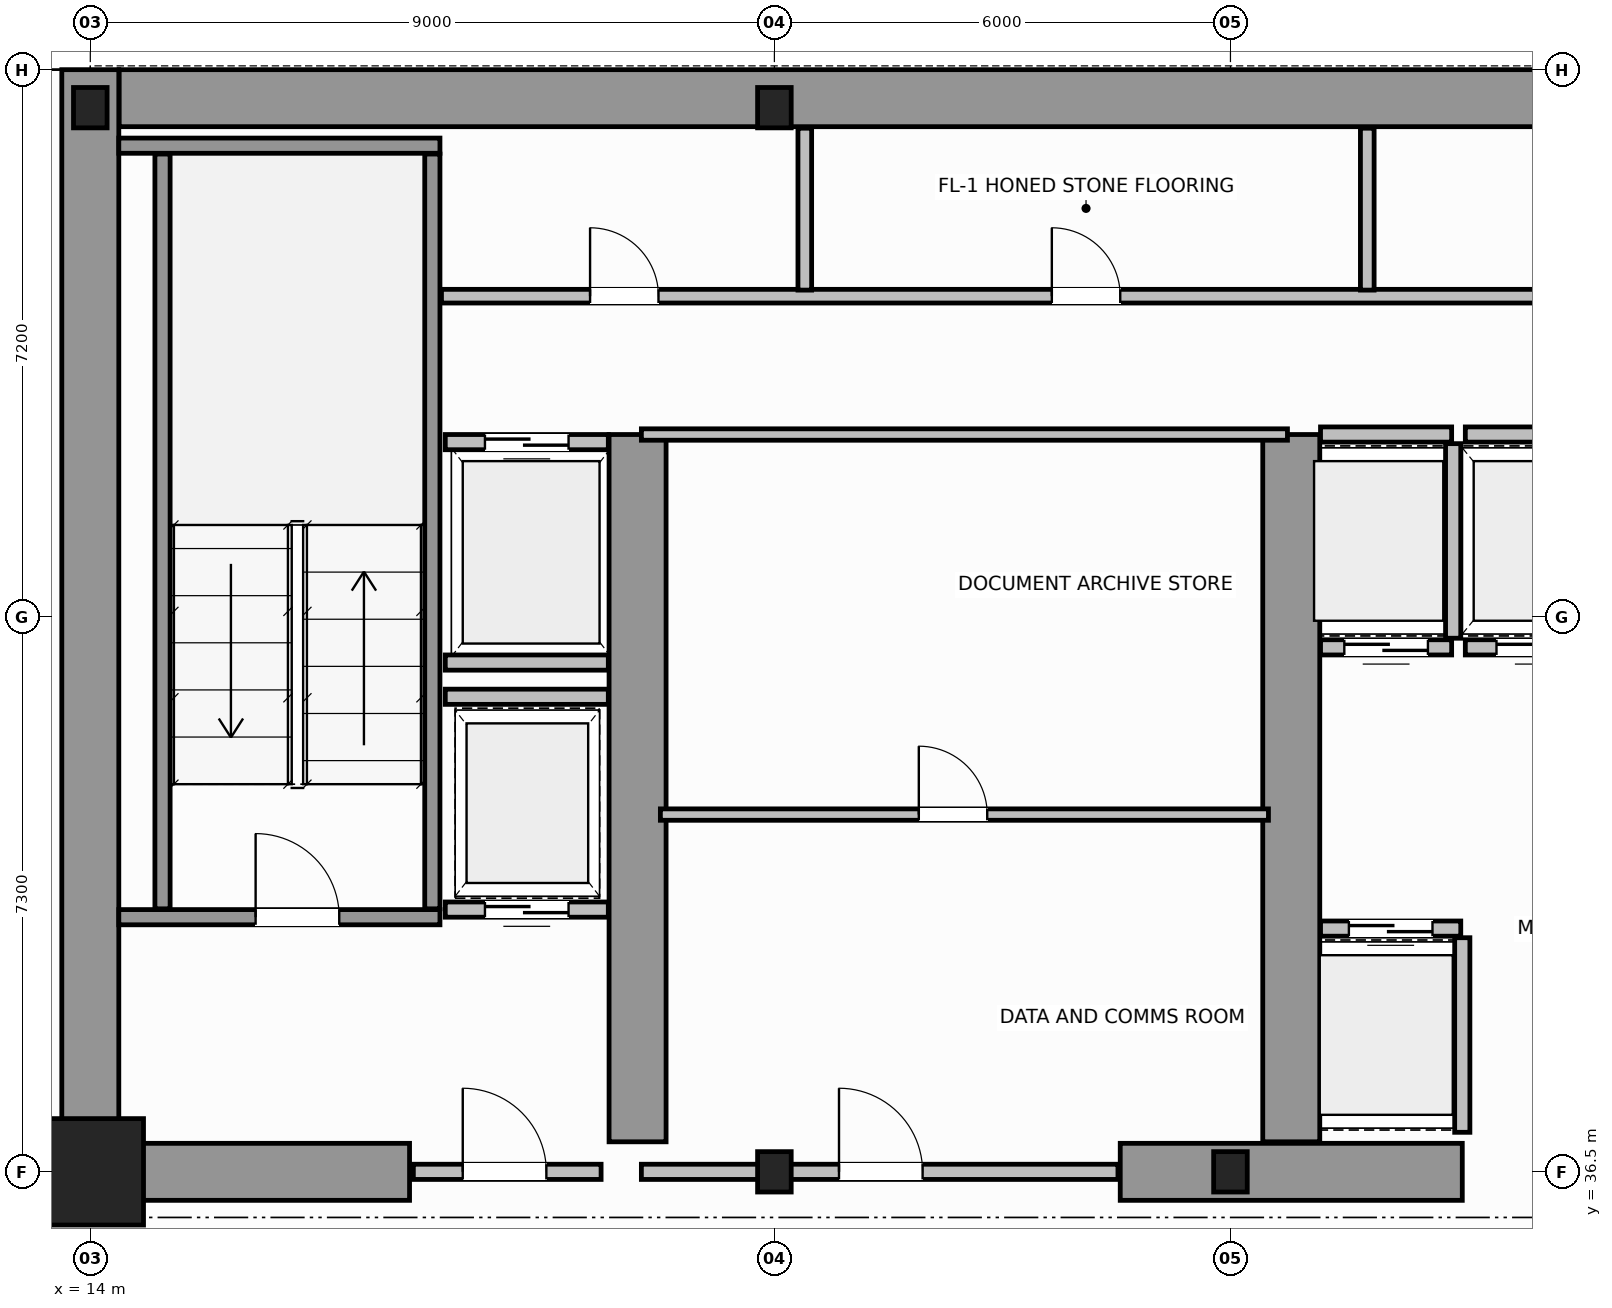
"""IFC4 building model, lengths in metres.
Left out: names, types, materials, properties, quantities, classifications, styles, units other than length and angle.
Written with IfcOpenShell. Run it as: python <this file> out.ifc"""

import sys

from ifc_helpers import new_model, si_unit, direction, frame, frame_2d, origin, origin_2d, place, context, subcontext, project, spatial, rectangle, i_section, extrude, source, transform, mapped, element, fill, save


model = new_model("IFC4")
c1 = context("Model", 3, precision=1e-05, world=origin(), true_north=direction((0.0, 1.0)))
c2 = subcontext(c1, "Body", "Model", "MODEL_VIEW")
j1 = project(units=[si_unit("LENGTHUNIT", "METRE"), si_unit("PLANEANGLEUNIT", "RADIAN")], contexts=[c1])
p1 = place(None, origin())
s1 = spatial("IfcSite", under=j1, at=p1, CompositionType="ELEMENT")
p2 = place(p1, origin())
s2 = spatial("IfcBuilding", under=s1, at=p2, CompositionType="ELEMENT")
p3 = place(p2, frame((0.0, 0.0, 114.8)))
s3 = spatial("IfcBuildingStorey", under=s2, at=p3, CompositionType="ELEMENT", Elevation=114.8)
m1 = source(origin(), c2, "Body", "SweptSolid", [
    extrude(rectangle(XDim=1.4, YDim=1.4, at=origin_2d()), origin(), (0.0, 0.0, 1.0), 3.8),
])
p4 = place(p3, frame((14.0, 36.5, 0.0), z_axis=(0.0, 0.0, 1.0), x_axis=(1.0, 0.0, 0.0)))
e1 = element("IfcColumn", 1, at=p4, inside=s3, PredefinedType="COLUMN", context=c2, shape_type="MappedRepresentation", body=[
    mapped(m1, transform((0.0, 0.0, 0.0), scale=1.0)),
])
m2 = source(origin(), c2, "Body", "SweptSolid", [
    extrude(i_section(OverallWidth=0.442, OverallDepth=0.531, WebThickness=0.065, FlangeThickness=0.076, FilletRadius=0.015, at=origin_2d()), origin(), (0.0, 0.0, 1.0), 3.8),
])
for number, where, z_axis, x_axis in (
    (2, (23.0, 36.5, 0.0), (0.0, 0.0, 1.0), (1.0, 0.0, 0.0)),
    (3, (29.0, 36.5, 0.0), (0.0, 0.0, 1.0), (1.0, 0.0, 0.0)),
    (4, (14.0, 50.5, 0.0), (0.0, 0.0, 1.0), (1.0, 0.0, 0.0)),
    (5, (23.0, 50.5, 0.0), (0.0, 0.0, 1.0), (1.0, 0.0, 0.0)),
):
    element("IfcColumn", number, at=place(p3, frame(where, z_axis=z_axis, x_axis=x_axis)), inside=s3, PredefinedType="COLUMN", context=c2, shape_type="MappedRepresentation", body=[
        mapped(m2, transform((0.0, 0.0, 0.0), scale=1.0)),
    ])
p5 = place(p3, frame((14.379, 50.625, 0.0), z_axis=(0.0, 0.0, 1.0), x_axis=(1.0, 0.0, 0.0)))
e6 = element("IfcWall", 6, at=p5, inside=s3, PredefinedType="SHEAR", context=c2, shape_type="SweptSolid", body=[
    extrude(rectangle(XDim=19.619, YDim=0.75, at=frame_2d((9.81, 0.0))), origin(), (0.0, 0.0, 1.0), 3.8),
])
p6 = place(p3, frame((14.0, 36.5, 0.0), z_axis=(0.0, 0.0, 1.0), x_axis=(0.0, 1.0, 0.0)))
e7 = element("IfcWall", 7, at=p6, inside=s3, PredefinedType="SHEAR", context=c2, shape_type="SweptSolid", body=[
    extrude(rectangle(XDim=14.5, YDim=0.75, at=frame_2d((7.25, 0.0))), origin(), (0.0, 0.0, 1.0), 3.8),
])
p7 = place(p3, frame((14.395, 36.5, 0.0), z_axis=(0.0, 0.0, 1.0), x_axis=(1.0, 0.0, 0.0)))
e8 = element("IfcWall", 8, at=p7, inside=s3, PredefinedType="SHEAR", context=c2, shape_type="SweptSolid", body=[
    extrude(rectangle(XDim=3.805, YDim=0.75, at=frame_2d((1.902, 0.0))), origin(), (0.0, 0.0, 1.0), 2.38),
])
p8 = place(p3, frame((27.55, 36.5, 0.0), z_axis=(0.0, 0.0, 1.0), x_axis=(1.0, 0.0, 0.0)))
e9 = element("IfcWall", 9, at=p8, inside=s3, PredefinedType="SHEAR", context=c2, shape_type="SweptSolid", body=[
    extrude(rectangle(XDim=4.5, YDim=0.75, at=frame_2d((2.25, 0.0))), origin(), (0.0, 0.0, 1.0), 3.8),
])
for number, where, z_axis, x_axis in (
    (10, (21.2, 36.895, 0.0), (0.0, 0.0, 1.0), (0.0, 1.0, 0.0)),
    (11, (29.8, 36.895, 0.0), (0.0, 0.0, 1.0), (0.0, 1.0, 0.0)),
):
    element("IfcWall", number, at=place(p3, frame(where, z_axis=z_axis, x_axis=x_axis)), inside=s3, PredefinedType="SHEAR", context=c2, shape_type="SweptSolid", body=[
        extrude(rectangle(XDim=9.305, YDim=0.75, at=frame_2d((4.652, 0.0))), origin(), (0.0, 0.0, 1.0), 3.8),
    ])
p9 = place(p3, frame((14.375, 39.85, 0.0), z_axis=(0.0, 0.0, 1.0), x_axis=(1.0, 0.0, 0.0)))
e12 = element("IfcWall", 12, at=p9, inside=s3, PredefinedType="SOLIDWALL", context=c2, shape_type="SweptSolid", body=[
    extrude(rectangle(XDim=4.225, YDim=0.2, at=frame_2d((2.113, 0.0))), origin(), (0.0, 0.0, 1.0), 3.8),
])
p10 = place(p9, frame((1.8, 0.0, 0.0)))
e13 = element("IfcOpeningElement", 13, at=p10, cuts=e12, PredefinedType="OPENING", context=c2, shape_type="SweptSolid", body=[
    extrude(rectangle(XDim=1.1, YDim=2.15, at=frame_2d((0.55, 1.075))), frame((0.0, 0.11, 0.0), z_axis=(0.0, -1.0, 0.0), x_axis=(1.0, 0.0, 0.0)), (0.0, 0.0, 1.0), 0.22),
])
p11 = place(p3, frame((14.375, 50.0, 0.0), z_axis=(0.0, 0.0, 1.0), x_axis=(1.0, 0.0, 0.0)))
e14 = element("IfcWall", 14, at=p11, inside=s3, PredefinedType="SOLIDWALL", context=c2, shape_type="SweptSolid", body=[
    extrude(rectangle(XDim=4.225, YDim=0.2, at=frame_2d((2.113, 0.0))), origin(), (0.0, 0.0, 1.0), 3.8),
])
for number, where, z_axis, x_axis in (
    (15, (14.95, 39.96, 0.0), (0.0, 0.0, 1.0), (0.0, 1.0, 0.0)),
    (16, (18.5, 39.96, 0.0), (0.0, 0.0, 1.0), (0.0, 1.0, 0.0)),
):
    element("IfcWall", number, at=place(p3, frame(where, z_axis=z_axis, x_axis=x_axis)), inside=s3, PredefinedType="SOLIDWALL", context=c2, shape_type="SweptSolid", body=[
        extrude(rectangle(XDim=9.93, YDim=0.2, at=frame_2d((4.965, 0.0))), origin(), (0.0, 0.0, 1.0), 3.8),
    ])
p12 = place(p3, frame((18.25, 36.5, 0.0), z_axis=(0.0, 0.0, 1.0), x_axis=(1.0, 0.0, 0.0)))
e17 = element("IfcWall", 17, at=p12, inside=s3, PredefinedType="SOLIDWALL", context=c2, shape_type="SweptSolid", body=[
    extrude(rectangle(XDim=2.47, YDim=0.2, at=frame_2d((1.235, 0.0))), origin(), (0.0, 0.0, 1.0), 2.37),
])
p13 = place(p12, frame((0.65, 0.0, 0.0)))
e18 = element("IfcOpeningElement", 18, at=p13, cuts=e17, PredefinedType="OPENING", context=c2, shape_type="SweptSolid", body=[
    extrude(rectangle(XDim=1.1, YDim=2.15, at=frame_2d((0.55, 1.075))), frame((0.0, 0.11, 0.0), z_axis=(0.0, -1.0, 0.0), x_axis=(1.0, 0.0, 0.0)), (0.0, 0.0, 1.0), 0.22),
])
p14 = place(p3, frame((30.185, 39.7, 0.0), z_axis=(0.0, 0.0, 1.0), x_axis=(1.0, 0.0, 0.0)))
e19 = element("IfcWall", 19, at=p14, inside=s3, PredefinedType="SOLIDWALL", context=c2, shape_type="SweptSolid", body=[
    extrude(rectangle(XDim=1.845, YDim=0.2, at=frame_2d((0.922, 0.0))), origin(), (0.0, 0.0, 1.0), 3.58),
])
p15 = place(p14, frame((0.373, 0.0, 0.0)))
e20 = element("IfcOpeningElement", 20, at=p15, cuts=e19, PredefinedType="OPENING", context=c2, shape_type="SweptSolid", body=[
    extrude(rectangle(XDim=1.1, YDim=2.15, at=frame_2d((0.55, 1.075))), frame((0.0, 0.11, 0.0), z_axis=(0.0, -1.0, 0.0), x_axis=(1.0, 0.0, 0.0)), (0.0, 0.0, 1.0), 0.22),
])
p16 = place(p3, frame((32.05, 37.02, 0.0), z_axis=(0.0, 0.0, 1.0), x_axis=(0.0, 1.0, 0.0)))
e21 = element("IfcWall", 21, at=p16, inside=s3, PredefinedType="SOLIDWALL", context=c2, shape_type="SweptSolid", body=[
    extrude(rectangle(XDim=2.56, YDim=0.2, at=frame_2d((1.28, 0.0))), origin(), (0.0, 0.0, 1.0), 3.58),
])
p17 = place(p3, frame((30.185, 43.4, 0.0), z_axis=(0.0, 0.0, 1.0), x_axis=(1.0, 0.0, 0.0)))
e22 = element("IfcWall", 22, at=p17, inside=s3, PredefinedType="SOLIDWALL", context=c2, shape_type="SweptSolid", body=[
    extrude(rectangle(XDim=1.725, YDim=0.2, at=frame_2d((0.862, 0.0))), origin(), (0.0, 0.0, 1.0), 3.58),
])
p18 = place(p17, frame((0.313, 0.0, 0.0)))
e23 = element("IfcOpeningElement", 23, at=p18, cuts=e22, PredefinedType="OPENING", context=c2, shape_type="SweptSolid", body=[
    extrude(rectangle(XDim=1.1, YDim=2.15, at=frame_2d((0.55, 1.075))), frame((0.0, 0.11, 0.0), z_axis=(0.0, -1.0, 0.0), x_axis=(1.0, 0.0, 0.0)), (0.0, 0.0, 1.0), 0.22),
])
p19 = place(p3, frame((30.185, 46.2, 0.0), z_axis=(0.0, 0.0, 1.0), x_axis=(1.0, 0.0, 0.0)))
e24 = element("IfcWall", 24, at=p19, inside=s3, PredefinedType="SOLIDWALL", context=c2, shape_type="SweptSolid", body=[
    extrude(rectangle(XDim=1.725, YDim=0.2, at=frame_2d((0.862, 0.0))), origin(), (0.0, 0.0, 1.0), 3.58),
])
p20 = place(p3, frame((31.93, 43.52, 0.0), z_axis=(0.0, 0.0, 1.0), x_axis=(0.0, 1.0, 0.0)))
e25 = element("IfcWall", 25, at=p20, inside=s3, PredefinedType="SOLIDWALL", context=c2, shape_type="SweptSolid", body=[
    extrude(rectangle(XDim=2.56, YDim=0.2, at=frame_2d((1.28, 0.0))), origin(), (0.0, 0.0, 1.0), 3.58),
])
p21 = place(p3, frame((32.09, 43.4, 0.0), z_axis=(0.0, 0.0, 1.0), x_axis=(1.0, 0.0, 0.0)))
e26 = element("IfcWall", 26, at=p21, inside=s3, PredefinedType="SOLIDWALL", context=c2, shape_type="SweptSolid", body=[
    extrude(rectangle(XDim=1.92, YDim=0.2, at=frame_2d((0.96, 0.0))), origin(), (0.0, 0.0, 1.0), 3.58),
])
p22 = place(p21, frame((0.41, 0.0, 0.0)))
e27 = element("IfcOpeningElement", 27, at=p22, cuts=e26, PredefinedType="OPENING", context=c2, shape_type="SweptSolid", body=[
    extrude(rectangle(XDim=1.1, YDim=2.15, at=frame_2d((0.55, 1.075))), frame((0.0, 0.11, 0.0), z_axis=(0.0, -1.0, 0.0), x_axis=(1.0, 0.0, 0.0)), (0.0, 0.0, 1.0), 0.22),
])
p23 = place(p3, frame((32.09, 46.2, 0.0), z_axis=(0.0, 0.0, 1.0), x_axis=(1.0, 0.0, 0.0)))
e28 = element("IfcWall", 28, at=p23, inside=s3, PredefinedType="SOLIDWALL", context=c2, shape_type="SweptSolid", body=[
    extrude(rectangle(XDim=1.92, YDim=0.2, at=frame_2d((0.96, 0.0))), origin(), (0.0, 0.0, 1.0), 3.58),
])
p24 = place(p3, frame((18.67, 46.1, 0.0), z_axis=(0.0, 0.0, 1.0), x_axis=(1.0, 0.0, 0.0)))
e29 = element("IfcWall", 29, at=p24, inside=s3, PredefinedType="SOLIDWALL", context=c2, shape_type="SweptSolid", body=[
    extrude(rectangle(XDim=2.145, YDim=0.2, at=frame_2d((1.073, 0.0))), origin(), (0.0, 0.0, 1.0), 3.58),
])
p25 = place(p24, frame((0.522, 0.0, 0.0)))
e30 = element("IfcOpeningElement", 30, at=p25, cuts=e29, PredefinedType="OPENING", context=c2, shape_type="SweptSolid", body=[
    extrude(rectangle(XDim=1.1, YDim=2.15, at=frame_2d((0.55, 1.075))), frame((0.0, 0.11, 0.0), z_axis=(0.0, -1.0, 0.0), x_axis=(1.0, 0.0, 0.0)), (0.0, 0.0, 1.0), 0.22),
])
p26 = place(p3, frame((18.67, 43.2, 0.0), z_axis=(0.0, 0.0, 1.0), x_axis=(1.0, 0.0, 0.0)))
e31 = element("IfcWall", 31, at=p26, inside=s3, PredefinedType="SOLIDWALL", context=c2, shape_type="SweptSolid", body=[
    extrude(rectangle(XDim=2.145, YDim=0.2, at=frame_2d((1.073, 0.0))), origin(), (0.0, 0.0, 1.0), 3.58),
])
p27 = place(p3, frame((18.67, 39.95, 0.0), z_axis=(0.0, 0.0, 1.0), x_axis=(1.0, 0.0, 0.0)))
e32 = element("IfcWall", 32, at=p27, inside=s3, PredefinedType="SOLIDWALL", context=c2, shape_type="SweptSolid", body=[
    extrude(rectangle(XDim=2.145, YDim=0.2, at=frame_2d((1.073, 0.0))), origin(), (0.0, 0.0, 1.0), 3.58),
])
p28 = place(p27, frame((0.522, 0.0, 0.0)))
e33 = element("IfcOpeningElement", 33, at=p28, cuts=e32, PredefinedType="OPENING", context=c2, shape_type="SweptSolid", body=[
    extrude(rectangle(XDim=1.1, YDim=2.15, at=frame_2d((0.55, 1.075))), frame((0.0, 0.11, 0.0), z_axis=(0.0, -1.0, 0.0), x_axis=(1.0, 0.0, 0.0)), (0.0, 0.0, 1.0), 0.22),
])
p29 = place(p3, frame((18.67, 42.75, 0.0), z_axis=(0.0, 0.0, 1.0), x_axis=(1.0, 0.0, 0.0)))
e34 = element("IfcWall", 34, at=p29, inside=s3, PredefinedType="SOLIDWALL", context=c2, shape_type="SweptSolid", body=[
    extrude(rectangle(XDim=2.145, YDim=0.2, at=frame_2d((1.073, 0.0))), origin(), (0.0, 0.0, 1.0), 3.58),
])
p30 = place(p3, frame((21.25, 36.5, 0.0), z_axis=(0.0, 0.0, 1.0), x_axis=(1.0, 0.0, 0.0)))
e35 = element("IfcWall", 35, at=p30, inside=s3, PredefinedType="SOLIDWALL", context=c2, shape_type="SweptSolid", body=[
    extrude(rectangle(XDim=6.27, YDim=0.2, at=frame_2d((3.135, 0.0))), origin(), (0.0, 0.0, 1.0), 2.37),
])
p31 = place(p30, frame((2.6, 0.0, 0.0)))
e36 = element("IfcOpeningElement", 36, at=p31, cuts=e35, PredefinedType="OPENING", context=c2, shape_type="SweptSolid", body=[
    extrude(rectangle(XDim=1.1, YDim=2.15, at=frame_2d((0.55, 1.075))), frame((0.0, 0.11, 0.0), z_axis=(0.0, -1.0, 0.0), x_axis=(1.0, 0.0, 0.0)), (0.0, 0.0, 1.0), 0.22),
])
p32 = place(p3, frame((21.25, 46.2, 0.0), z_axis=(0.0, 0.0, 1.0), x_axis=(1.0, 0.0, 0.0)))
e37 = element("IfcWall", 37, at=p32, inside=s3, PredefinedType="PARTITIONING", context=c2, shape_type="SweptSolid", body=[
    extrude(rectangle(XDim=8.5, YDim=0.15, at=frame_2d((4.25, 0.0))), origin(), (0.0, 0.0, 1.0), 3.58),
])
p33 = place(p3, frame((21.5, 41.2, 0.0), z_axis=(0.0, 0.0, 1.0), x_axis=(1.0, 0.0, 0.0)))
e38 = element("IfcWall", 38, at=p33, inside=s3, PredefinedType="PARTITIONING", context=c2, shape_type="SweptSolid", body=[
    extrude(rectangle(XDim=8.0, YDim=0.15, at=frame_2d((4.0, 0.0))), origin(), (0.0, 0.0, 1.0), 3.58),
])
p34 = place(p33, frame((3.4, 0.0, 0.0)))
e39 = element("IfcOpeningElement", 39, at=p34, cuts=e38, PredefinedType="OPENING", context=c2, shape_type="SweptSolid", body=[
    extrude(rectangle(XDim=0.9, YDim=2.1, at=frame_2d((0.45, 1.05))), frame((0.0, 0.085, 0.0), z_axis=(0.0, -1.0, 0.0), x_axis=(1.0, 0.0, 0.0)), (0.0, 0.0, 1.0), 0.17),
])
p35 = place(p3, frame((18.62, 48.02, 0.0), z_axis=(0.0, 0.0, 1.0), x_axis=(1.0, 0.0, 0.0)))
e40 = element("IfcWall", 40, at=p35, inside=s3, PredefinedType="PLUMBINGWALL", context=c2, shape_type="SweptSolid", body=[
    extrude(rectangle(XDim=30.76, YDim=0.18, at=frame_2d((15.38, 0.0))), origin(), (0.0, 0.0, 1.0), 3.58),
])
p36 = place(p35, frame((1.955, 0.0, 0.0)))
e41 = element("IfcOpeningElement", 41, at=p36, cuts=e40, PredefinedType="OPENING", context=c2, shape_type="SweptSolid", body=[
    extrude(rectangle(XDim=0.9, YDim=2.15, at=frame_2d((0.45, 1.075))), frame((0.0, 0.1, 0.0), z_axis=(0.0, -1.0, 0.0), x_axis=(1.0, 0.0, 0.0)), (0.0, 0.0, 1.0), 0.2),
])
p37 = place(p35, frame((8.03, 0.0, 0.0)))
e42 = element("IfcOpeningElement", 42, at=p37, cuts=e40, PredefinedType="OPENING", context=c2, shape_type="SweptSolid", body=[
    extrude(rectangle(XDim=0.9, YDim=2.15, at=frame_2d((0.45, 1.075))), frame((0.0, 0.1, 0.0), z_axis=(0.0, -1.0, 0.0), x_axis=(1.0, 0.0, 0.0)), (0.0, 0.0, 1.0), 0.2),
])
p38 = place(p35, frame((16.93, 0.0, 0.0)))
e43 = element("IfcOpeningElement", 43, at=p38, cuts=e40, PredefinedType="OPENING", context=c2, shape_type="SweptSolid", body=[
    extrude(rectangle(XDim=0.9, YDim=2.15, at=frame_2d((0.45, 1.075))), frame((0.0, 0.1, 0.0), z_axis=(0.0, -1.0, 0.0), x_axis=(1.0, 0.0, 0.0)), (0.0, 0.0, 1.0), 0.2),
])
p39 = place(p35, frame((26.205, 0.0, 0.0)))
e44 = element("IfcOpeningElement", 44, at=p39, cuts=e40, PredefinedType="OPENING", context=c2, shape_type="SweptSolid", body=[
    extrude(rectangle(XDim=0.9, YDim=2.15, at=frame_2d((0.45, 1.075))), frame((0.0, 0.1, 0.0), z_axis=(0.0, -1.0, 0.0), x_axis=(1.0, 0.0, 0.0)), (0.0, 0.0, 1.0), 0.2),
])
for number, where, z_axis, x_axis in (
    (45, (23.4, 48.1, 0.0), (0.0, 0.0, 1.0), (0.0, 1.0, 0.0)),
    (46, (30.8, 48.1, 0.0), (0.0, 0.0, 1.0), (0.0, 1.0, 0.0)),
):
    element("IfcWall", number, at=place(p3, frame(where, z_axis=z_axis, x_axis=x_axis)), inside=s3, PredefinedType="PLUMBINGWALL", context=c2, shape_type="SweptSolid", body=[
        extrude(rectangle(XDim=2.13, YDim=0.18, at=frame_2d((1.065, 0.0))), origin(), (0.0, 0.0, 1.0), 3.58),
    ])
p40 = place(p3, frame((7.27, 36.48, 0.0), z_axis=(0.0, 0.0, 1.0), x_axis=(1.0, 0.0, 0.0)))
e47 = element("IfcWall", 47, at=p40, inside=s3, PredefinedType="PARTITIONING", context=c2, shape_type="SweptSolid", body=[
    extrude(rectangle(XDim=6.67, YDim=0.12, at=frame_2d((3.335, 0.0))), origin(), (0.0, 0.0, 1.0), 2.87),
])
p41 = place(p40, frame((2.885, 0.0, 0.0)))
e48 = element("IfcOpeningElement", 48, at=p41, cuts=e47, PredefinedType="OPENING", context=c2, shape_type="SweptSolid", body=[
    extrude(rectangle(XDim=0.9, YDim=2.15, at=frame_2d((0.45, 1.075))), frame((0.0, 0.07, 0.0), z_axis=(0.0, -1.0, 0.0), x_axis=(1.0, 0.0, 0.0)), (0.0, 0.0, 1.0), 0.14),
])
m3 = source(origin(), c2, "Body", "SweptSolid", [
    extrude(rectangle(XDim=1.1, YDim=2.15, at=frame_2d((0.55, 1.075))), frame((0.0, 0.025, 0.0), z_axis=(0.0, -1.0, 0.0), x_axis=(1.0, 0.0, 0.0)), (0.0, 0.0, 1.0), 0.05),
])
p42 = place(p10, origin())
e49 = element("IfcDoor", 49, at=p42, inside=s3, OperationType="SINGLE_SWING_LEFT", PredefinedType="DOOR", context=c2, shape_type="MappedRepresentation", body=[
    mapped(m3, transform((0.0, 0.0, 0.0), scale=1.0)),
])
fill(e13, e49)
p43 = place(p13, origin())
e50 = element("IfcDoor", 50, at=p43, inside=s3, OperationType="SINGLE_SWING_RIGHT", PredefinedType="DOOR", context=c2, shape_type="MappedRepresentation", body=[
    mapped(m3, transform((0.0, 0.0, 0.0), scale=1.0)),
])
fill(e18, e50)
p44 = place(p15, origin())
e51 = element("IfcDoor", 51, at=p44, inside=s3, OperationType="DOUBLE_DOOR_SLIDING", PredefinedType="DOOR", context=c2, shape_type="MappedRepresentation", body=[
    mapped(m3, transform((0.0, 0.0, 0.0), scale=1.0)),
])
fill(e20, e51)
p45 = place(p18, origin())
e52 = element("IfcDoor", 52, at=p45, inside=s3, OperationType="DOUBLE_DOOR_SLIDING", PredefinedType="DOOR", context=c2, shape_type="MappedRepresentation", body=[
    mapped(m3, transform((0.0, 0.0, 0.0), scale=1.0)),
])
fill(e23, e52)
p46 = place(p22, origin())
e53 = element("IfcDoor", 53, at=p46, inside=s3, OperationType="DOUBLE_DOOR_SLIDING", PredefinedType="DOOR", context=c2, shape_type="MappedRepresentation", body=[
    mapped(m3, transform((0.0, 0.0, 0.0), scale=1.0)),
])
fill(e27, e53)
p47 = place(p25, origin())
e54 = element("IfcDoor", 54, at=p47, inside=s3, OperationType="DOUBLE_DOOR_SLIDING", PredefinedType="DOOR", context=c2, shape_type="MappedRepresentation", body=[
    mapped(m3, transform((0.0, 0.0, 0.0), scale=1.0)),
])
fill(e30, e54)
p48 = place(p28, origin())
e55 = element("IfcDoor", 55, at=p48, inside=s3, OperationType="DOUBLE_DOOR_SLIDING", PredefinedType="DOOR", context=c2, shape_type="MappedRepresentation", body=[
    mapped(m3, transform((0.0, 0.0, 0.0), scale=1.0)),
])
fill(e33, e55)
p49 = place(p31, origin())
e56 = element("IfcDoor", 56, at=p49, inside=s3, OperationType="SINGLE_SWING_LEFT", PredefinedType="DOOR", context=c2, shape_type="MappedRepresentation", body=[
    mapped(m3, transform((0.0, 0.0, 0.0), scale=1.0)),
])
fill(e36, e56)
m4 = source(origin(), c2, "Body", "SweptSolid", [
    extrude(rectangle(XDim=0.9, YDim=2.1, at=frame_2d((0.45, 1.05))), frame((0.0, 0.025, 0.0), z_axis=(0.0, -1.0, 0.0), x_axis=(1.0, 0.0, 0.0)), (0.0, 0.0, 1.0), 0.05),
])
p50 = place(p34, origin())
e57 = element("IfcDoor", 57, at=p50, inside=s3, OperationType="SINGLE_SWING_RIGHT", PredefinedType="DOOR", context=c2, shape_type="MappedRepresentation", body=[
    mapped(m4, transform((0.0, 0.0, 0.0), scale=1.0)),
])
fill(e39, e57)
m5 = source(origin(), c2, "Body", "SweptSolid", [
    extrude(rectangle(XDim=0.9, YDim=2.15, at=frame_2d((0.45, 1.075))), frame((0.0, 0.025, 0.0), z_axis=(0.0, -1.0, 0.0), x_axis=(1.0, 0.0, 0.0)), (0.0, 0.0, 1.0), 0.05),
])
p51 = place(p36, origin())
e58 = element("IfcDoor", 58, at=p51, inside=s3, OperationType="SINGLE_SWING_LEFT", PredefinedType="DOOR", context=c2, shape_type="MappedRepresentation", body=[
    mapped(m5, transform((0.0, 0.0, 0.0), scale=1.0)),
])
fill(e41, e58)
p52 = place(p37, origin())
e59 = element("IfcDoor", 59, at=p52, inside=s3, OperationType="SINGLE_SWING_RIGHT", PredefinedType="DOOR", context=c2, shape_type="MappedRepresentation", body=[
    mapped(m5, transform((0.0, 0.0, 0.0), scale=1.0)),
])
fill(e42, e59)
save(model, sys.argv[1])
